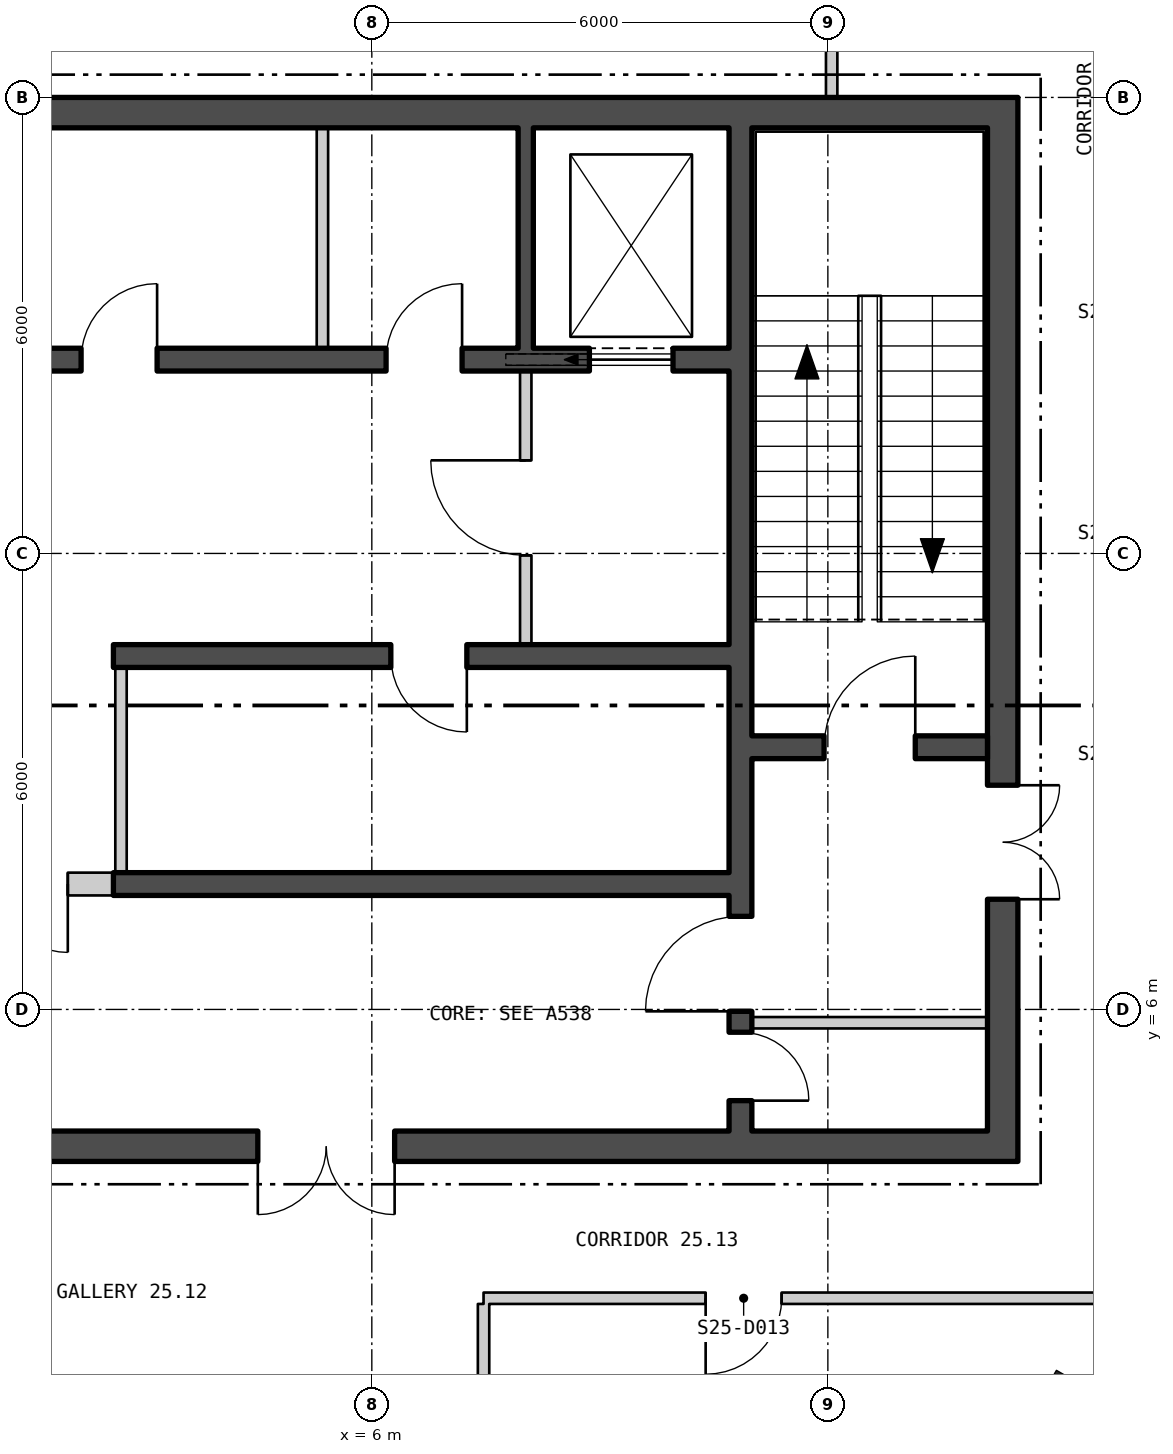
"""IFC4 building model, lengths in metres.
Left out: names, types, materials, properties, quantities, classifications, styles, units other than length and angle.
Written with IfcOpenShell. Run it as: python <this file> out.ifc"""

import sys

from ifc_helpers import new_model, si_unit, direction, frame, frame_2d, origin, origin_2d, place, context, subcontext, project, spatial, polyline, rectangle, hollow_rectangle, outline, extrude, element, fill, save


model = new_model("IFC4")
c1 = context("Model", 3, precision=1e-05, world=origin(), true_north=direction((0.0, 1.0)))
c2 = subcontext(c1, "Body", "Model", "MODEL_VIEW")
j1 = project(units=[si_unit("LENGTHUNIT", "METRE"), si_unit("PLANEANGLEUNIT", "RADIAN")], contexts=[c1])
p1 = place(None, origin())
s1 = spatial("IfcSite", under=j1, at=p1, CompositionType="ELEMENT")
p2 = place(p1, origin())
s2 = spatial("IfcBuilding", under=s1, at=p2, CompositionType="ELEMENT")
p3 = place(p2, frame((0.0, 0.0, 321.0)))
s3 = spatial("IfcBuildingStorey", under=s2, at=p3, CompositionType="ELEMENT", Elevation=321.0)
p4 = place(p3, frame((15.198, 0.882, 0.0), z_axis=(0.0, 0.0, 1.0), x_axis=(0.5, 0.866025403784, 0.0)))
e1 = element("IfcColumn", 1, at=p4, inside=s3, PredefinedType="COLUMN", context=c2, shape_type="SweptSolid", body=[
    extrude(hollow_rectangle(XDim=0.45, YDim=0.7, WallThickness=0.04, at=origin_2d()), origin(), (0.0, 0.0, 1.0), 4.2),
])
p5 = place(p3, frame((2.01, -23.11, -0.18), z_axis=(0.0, 0.0, 1.0), x_axis=(0.500000141277, 0.866025322218, 0.0)))
e2 = element("IfcWall", 2, at=p5, inside=s3, PredefinedType="SOLIDWALL", context=c2, shape_type="SweptSolid", body=[
    extrude(outline(polyline([(-0.13, -0.225), (45.86, -0.225), (45.6, 0.225), (0.13, 0.225), (-0.13, -0.225)])), origin(), (0.0, 0.0, 1.0), 3.98),
])
p6 = place(p5, frame((1.424, 0.0, 1.08)))
e3 = element("IfcOpeningElement", 3, at=p6, cuts=e2, PredefinedType="OPENING", context=c2, shape_type="SweptSolid", body=[
    extrude(rectangle(XDim=2.4, YDim=2.3, at=frame_2d((1.2, 1.15))), frame((0.0, 0.235, 0.0), z_axis=(0.0, -1.0, 0.0), x_axis=(1.0, 0.0, 0.0)), (0.0, 0.0, 1.0), 0.47),
])
p7 = place(p5, frame((5.892, 0.0, 1.08)))
e4 = element("IfcOpeningElement", 4, at=p7, cuts=e2, PredefinedType="OPENING", context=c2, shape_type="SweptSolid", body=[
    extrude(rectangle(XDim=2.4, YDim=2.3, at=frame_2d((1.2, 1.15))), frame((0.0, 0.235, 0.0), z_axis=(0.0, -1.0, 0.0), x_axis=(1.0, 0.0, 0.0)), (0.0, 0.0, 1.0), 0.47),
])
p8 = place(p5, frame((14.905, 0.0, 1.08)))
e5 = element("IfcOpeningElement", 5, at=p8, cuts=e2, PredefinedType="OPENING", context=c2, shape_type="SweptSolid", body=[
    extrude(rectangle(XDim=2.4, YDim=2.3, at=frame_2d((1.2, 1.15))), frame((0.0, 0.235, 0.0), z_axis=(0.0, -1.0, 0.0), x_axis=(1.0, 0.0, 0.0)), (0.0, 0.0, 1.0), 0.47),
])
p9 = place(p5, frame((19.412, 0.0, 1.08)))
e6 = element("IfcOpeningElement", 6, at=p9, cuts=e2, PredefinedType="OPENING", context=c2, shape_type="SweptSolid", body=[
    extrude(rectangle(XDim=2.4, YDim=2.3, at=frame_2d((1.2, 1.15))), frame((0.0, 0.235, 0.0), z_axis=(0.0, -1.0, 0.0), x_axis=(1.0, 0.0, 0.0)), (0.0, 0.0, 1.0), 0.47),
])
p10 = place(p5, frame((23.918, 0.0, 1.08)))
e7 = element("IfcOpeningElement", 7, at=p10, cuts=e2, PredefinedType="OPENING", context=c2, shape_type="SweptSolid", body=[
    extrude(rectangle(XDim=2.4, YDim=2.3, at=frame_2d((1.2, 1.15))), frame((0.0, 0.235, 0.0), z_axis=(0.0, -1.0, 0.0), x_axis=(1.0, 0.0, 0.0)), (0.0, 0.0, 1.0), 0.47),
])
p11 = place(p5, frame((28.425, 0.0, 1.08)))
e8 = element("IfcOpeningElement", 8, at=p11, cuts=e2, PredefinedType="OPENING", context=c2, shape_type="SweptSolid", body=[
    extrude(rectangle(XDim=2.4, YDim=2.3, at=frame_2d((1.2, 1.15))), frame((0.0, 0.235, 0.0), z_axis=(0.0, -1.0, 0.0), x_axis=(1.0, 0.0, 0.0)), (0.0, 0.0, 1.0), 0.47),
])
p12 = place(p5, frame((37.438, 0.0, 1.08)))
e9 = element("IfcOpeningElement", 9, at=p12, cuts=e2, PredefinedType="OPENING", context=c2, shape_type="SweptSolid", body=[
    extrude(rectangle(XDim=2.4, YDim=2.3, at=frame_2d((1.2, 1.15))), frame((0.0, 0.235, 0.0), z_axis=(0.0, -1.0, 0.0), x_axis=(1.0, 0.0, 0.0)), (0.0, 0.0, 1.0), 0.47),
])
p13 = place(p5, frame((41.907, 0.0, 1.08)))
e10 = element("IfcOpeningElement", 10, at=p13, cuts=e2, PredefinedType="OPENING", context=c2, shape_type="SweptSolid", body=[
    extrude(rectangle(XDim=2.4, YDim=2.3, at=frame_2d((1.2, 1.15))), frame((0.0, 0.235, 0.0), z_axis=(0.0, -1.0, 0.0), x_axis=(1.0, 0.0, 0.0)), (0.0, 0.0, 1.0), 0.47),
])
p14 = place(p3, frame((-14.5, 4.2, 0.0), z_axis=(0.0, 0.0, 1.0), x_axis=(1.0, 0.0, 0.0)))
e11 = element("IfcWall", 11, at=p14, inside=s3, PredefinedType="SHEAR", context=c2, shape_type="SweptSolid", body=[
    extrude(rectangle(XDim=29.0, YDim=0.4, at=frame_2d((14.5, 0.0))), origin(), (0.0, 0.0, 1.0), 4.0),
])
p15 = place(p14, frame((9.0, 0.0, 0.0)))
e12 = element("IfcOpeningElement", 12, at=p15, cuts=e11, PredefinedType="OPENING", context=c2, shape_type="SweptSolid", body=[
    extrude(rectangle(XDim=1.8, YDim=2.4, at=frame_2d((0.9, 1.2))), frame((0.0, 0.21, 0.0), z_axis=(0.0, -1.0, 0.0), x_axis=(1.0, 0.0, 0.0)), (0.0, 0.0, 1.0), 0.42),
])
p16 = place(p14, frame((19.0, 0.0, 0.0)))
e13 = element("IfcOpeningElement", 13, at=p16, cuts=e11, PredefinedType="OPENING", context=c2, shape_type="SweptSolid", body=[
    extrude(rectangle(XDim=1.8, YDim=2.4, at=frame_2d((0.9, 1.2))), frame((0.0, 0.21, 0.0), z_axis=(0.0, -1.0, 0.0), x_axis=(1.0, 0.0, 0.0)), (0.0, 0.0, 1.0), 0.42),
])
p17 = place(p3, frame((-14.5, 17.8, 0.0), z_axis=(0.0, 0.0, 1.0), x_axis=(1.0, 0.0, 0.0)))
e14 = element("IfcWall", 14, at=p17, inside=s3, PredefinedType="SHEAR", context=c2, shape_type="SweptSolid", body=[
    extrude(rectangle(XDim=29.0, YDim=0.4, at=frame_2d((14.5, 0.0))), origin(), (0.0, 0.0, 1.0), 4.0),
])
p18 = place(p3, frame((14.3, 4.4, 0.0), z_axis=(0.0, 0.0, 1.0), x_axis=(0.0, 1.0, 0.0)))
e15 = element("IfcWall", 15, at=p18, inside=s3, PredefinedType="SHEAR", context=c2, shape_type="SweptSolid", body=[
    extrude(rectangle(XDim=13.2, YDim=0.4, at=frame_2d((6.6, 0.0))), origin(), (0.0, 0.0, 1.0), 4.0),
])
p19 = place(p18, frame((3.05, 0.0, 0.0)))
e16 = element("IfcOpeningElement", 16, at=p19, cuts=e15, PredefinedType="OPENING", context=c2, shape_type="SweptSolid", body=[
    extrude(rectangle(XDim=1.5, YDim=2.1, at=frame_2d((0.75, 1.05))), frame((0.0, 0.21, 0.0), z_axis=(0.0, -1.0, 0.0), x_axis=(1.0, 0.0, 0.0)), (0.0, 0.0, 1.0), 0.42),
])
p20 = place(p3, frame((10.85, 4.4, 0.0), z_axis=(0.0, 0.0, 1.0), x_axis=(0.0, 1.0, 0.0)))
e17 = element("IfcWall", 17, at=p20, inside=s3, PredefinedType="SHEAR", context=c2, shape_type="SweptSolid", body=[
    extrude(rectangle(XDim=13.2, YDim=0.3, at=frame_2d((6.6, 0.0))), origin(), (0.0, 0.0, 1.0), 4.0),
])
p21 = place(p20, frame((1.575, 0.0, 0.0)))
e18 = element("IfcOpeningElement", 18, at=p21, cuts=e17, PredefinedType="OPENING", context=c2, shape_type="SweptSolid", body=[
    extrude(rectangle(XDim=1.25, YDim=2.1, at=frame_2d((0.625, 1.05))), frame((0.0, 0.16, 0.0), z_axis=(0.0, -1.0, 0.0), x_axis=(1.0, 0.0, 0.0)), (0.0, 0.0, 1.0), 0.32),
])
p22 = place(p20, frame((0.4, 0.0, 0.0)))
e19 = element("IfcOpeningElement", 19, at=p22, cuts=e17, PredefinedType="OPENING", context=c2, shape_type="SweptSolid", body=[
    extrude(rectangle(XDim=0.9, YDim=2.1, at=frame_2d((0.45, 1.05))), frame((0.0, 0.16, 0.0), z_axis=(0.0, -1.0, 0.0), x_axis=(1.0, 0.0, 0.0)), (0.0, 0.0, 1.0), 0.32),
])
p23 = place(p3, frame((11.0, 9.45, 0.0), z_axis=(0.0, 0.0, 1.0), x_axis=(1.0, 0.0, 0.0)))
e20 = element("IfcWall", 20, at=p23, inside=s3, PredefinedType="SHEAR", context=c2, shape_type="SweptSolid", body=[
    extrude(rectangle(XDim=3.1, YDim=0.3, at=frame_2d((1.55, 0.0))), origin(), (0.0, 0.0, 1.0), 4.0),
])
p24 = place(p23, frame((0.95, 0.0, 0.0)))
e21 = element("IfcOpeningElement", 21, at=p24, cuts=e20, PredefinedType="OPENING", context=c2, shape_type="SweptSolid", body=[
    extrude(rectangle(XDim=1.2, YDim=2.1, at=frame_2d((0.6, 1.05))), frame((0.0, 0.16, 0.0), z_axis=(0.0, -1.0, 0.0), x_axis=(1.0, 0.0, 0.0)), (0.0, 0.0, 1.0), 0.32),
])
p25 = place(p3, frame((-10.7, 14.55, 0.0), z_axis=(0.0, 0.0, 1.0), x_axis=(1.0, 0.0, 0.0)))
e22 = element("IfcWall", 22, at=p25, inside=s3, PredefinedType="SHEAR", context=c2, shape_type="SweptSolid", body=[
    extrude(rectangle(XDim=21.4, YDim=0.3, at=frame_2d((10.7, 0.0))), origin(), (0.0, 0.0, 1.0), 4.0),
])
p26 = place(p25, frame((0.738, 0.0, 0.0)))
e23 = element("IfcOpeningElement", 23, at=p26, cuts=e22, PredefinedType="OPENING", context=c2, shape_type="SweptSolid", body=[
    extrude(rectangle(XDim=1.1, YDim=2.1, at=frame_2d((0.55, 1.05))), frame((0.0, 0.16, 0.0), z_axis=(0.0, -1.0, 0.0), x_axis=(1.0, 0.0, 0.0)), (0.0, 0.0, 1.0), 0.32),
])
p27 = place(p25, frame((3.462, 0.0, 0.0)))
e24 = element("IfcOpeningElement", 24, at=p27, cuts=e22, PredefinedType="OPENING", context=c2, shape_type="SweptSolid", body=[
    extrude(rectangle(XDim=1.1, YDim=2.1, at=frame_2d((0.55, 1.05))), frame((0.0, 0.16, 0.0), z_axis=(0.0, -1.0, 0.0), x_axis=(1.0, 0.0, 0.0)), (0.0, 0.0, 1.0), 0.32),
])
p28 = place(p25, frame((6.138, 0.0, 0.0)))
e25 = element("IfcOpeningElement", 25, at=p28, cuts=e22, PredefinedType="OPENING", context=c2, shape_type="SweptSolid", body=[
    extrude(rectangle(XDim=1.1, YDim=2.1, at=frame_2d((0.55, 1.05))), frame((0.0, 0.16, 0.0), z_axis=(0.0, -1.0, 0.0), x_axis=(1.0, 0.0, 0.0)), (0.0, 0.0, 1.0), 0.32),
])
p29 = place(p25, frame((8.812, 0.0, 0.0)))
e26 = element("IfcOpeningElement", 26, at=p29, cuts=e22, PredefinedType="OPENING", context=c2, shape_type="SweptSolid", body=[
    extrude(rectangle(XDim=1.1, YDim=2.1, at=frame_2d((0.55, 1.05))), frame((0.0, 0.16, 0.0), z_axis=(0.0, -1.0, 0.0), x_axis=(1.0, 0.0, 0.0)), (0.0, 0.0, 1.0), 0.32),
])
p30 = place(p25, frame((19.562, 0.0, 0.0)))
e27 = element("IfcOpeningElement", 27, at=p30, cuts=e22, PredefinedType="OPENING", context=c2, shape_type="SweptSolid", body=[
    extrude(rectangle(XDim=1.1, YDim=2.1, at=frame_2d((0.55, 1.05))), frame((0.0, 0.16, 0.0), z_axis=(0.0, -1.0, 0.0), x_axis=(1.0, 0.0, 0.0)), (0.0, 0.0, 1.0), 0.32),
])
p31 = place(p25, frame((12.875, 0.0, 0.0)))
e28 = element("IfcOpeningElement", 28, at=p31, cuts=e22, PredefinedType="OPENING", context=c2, shape_type="SweptSolid", body=[
    extrude(rectangle(XDim=1.0, YDim=2.1, at=frame_2d((0.5, 1.05))), frame((0.0, 0.16, 0.0), z_axis=(0.0, -1.0, 0.0), x_axis=(1.0, 0.0, 0.0)), (0.0, 0.0, 1.0), 0.32),
])
p32 = place(p25, frame((16.887, 0.0, 0.0)))
e29 = element("IfcOpeningElement", 29, at=p32, cuts=e22, PredefinedType="OPENING", context=c2, shape_type="SweptSolid", body=[
    extrude(rectangle(XDim=1.0, YDim=2.1, at=frame_2d((0.5, 1.05))), frame((0.0, 0.16, 0.0), z_axis=(0.0, -1.0, 0.0), x_axis=(1.0, 0.0, 0.0)), (0.0, 0.0, 1.0), 0.32),
])
p33 = place(p3, frame((2.6, 10.65, 0.0), z_axis=(0.0, 0.0, 1.0), x_axis=(1.0, 0.0, 0.0)))
e30 = element("IfcWall", 30, at=p33, inside=s3, PredefinedType="SHEAR", context=c2, shape_type="SweptSolid", body=[
    extrude(rectangle(XDim=8.1, YDim=0.3, at=frame_2d((4.05, 0.0))), origin(), (0.0, 0.0, 1.0), 4.0),
])
p34 = place(p33, frame((3.65, 0.0, 0.0)))
e31 = element("IfcOpeningElement", 31, at=p34, cuts=e30, PredefinedType="OPENING", context=c2, shape_type="SweptSolid", body=[
    extrude(rectangle(XDim=1.0, YDim=2.1, at=frame_2d((0.5, 1.05))), frame((0.0, 0.16, 0.0), z_axis=(0.0, -1.0, 0.0), x_axis=(1.0, 0.0, 0.0)), (0.0, 0.0, 1.0), 0.32),
])
p35 = place(p3, frame((2.6, 7.65, 0.0), z_axis=(0.0, 0.0, 1.0), x_axis=(1.0, 0.0, 0.0)))
e32 = element("IfcWall", 32, at=p35, inside=s3, PredefinedType="SHEAR", context=c2, shape_type="SweptSolid", body=[
    extrude(rectangle(XDim=8.1, YDim=0.3, at=frame_2d((4.05, 0.0))), origin(), (0.0, 0.0, 1.0), 4.0),
])
p36 = place(p3, frame((5.35, 14.7, 0.0), z_axis=(0.0, 0.0, 1.0), x_axis=(0.0, 1.0, 0.0)))
e33 = element("IfcWall", 33, at=p36, inside=s3, PredefinedType="PARTITIONING", context=c2, shape_type="SweptSolid", body=[
    extrude(rectangle(XDim=2.9, YDim=0.15, at=frame_2d((1.45, 0.0))), origin(), (0.0, 0.0, 1.0), 4.0),
])
p37 = place(p3, frame((8.025, 14.7, 0.0), z_axis=(0.0, 0.0, 1.0), x_axis=(0.0, 1.0, 0.0)))
e34 = element("IfcWall", 34, at=p37, inside=s3, PredefinedType="SHEAR", context=c2, shape_type="SweptSolid", body=[
    extrude(rectangle(XDim=2.9, YDim=0.2, at=frame_2d((1.45, 0.0))), origin(), (0.0, 0.0, 1.0), 4.0),
])
p38 = place(p3, frame((2.7, 7.8, 0.0), z_axis=(0.0, 0.0, 1.0), x_axis=(0.0, 1.0, 0.0)))
e35 = element("IfcWall", 35, at=p38, inside=s3, PredefinedType="PARTITIONING", context=c2, shape_type="SweptSolid", body=[
    extrude(rectangle(XDim=2.7, YDim=0.15, at=frame_2d((1.35, 0.0))), origin(), (0.0, 0.0, 1.0), 4.0),
])
p39 = place(p3, frame((8.025, 10.8, 0.0), z_axis=(0.0, 0.0, 1.0), x_axis=(0.0, 1.0, 0.0)))
e36 = element("IfcWall", 36, at=p39, inside=s3, PredefinedType="PARTITIONING", context=c2, shape_type="SweptSolid", body=[
    extrude(rectangle(XDim=3.6, YDim=0.15, at=frame_2d((1.8, 0.0))), origin(), (0.0, 0.0, 1.0), 4.0),
])
p40 = place(p39, frame((1.175, 0.0, 0.0)))
e37 = element("IfcOpeningElement", 37, at=p40, cuts=e36, PredefinedType="OPENING", context=c2, shape_type="SweptSolid", body=[
    extrude(rectangle(XDim=1.25, YDim=2.1, at=frame_2d((0.625, 1.05))), frame((0.0, 0.085, 0.0), z_axis=(0.0, -1.0, 0.0), x_axis=(1.0, 0.0, 0.0)), (0.0, 0.0, 1.0), 0.17),
])
p41 = place(p3, frame((11.0, 5.825, 0.0), z_axis=(0.0, 0.0, 1.0), x_axis=(1.0, 0.0, 0.0)))
e38 = element("IfcWall", 38, at=p41, inside=s3, PredefinedType="PARTITIONING", context=c2, shape_type="SweptSolid", body=[
    extrude(rectangle(XDim=3.1, YDim=0.15, at=frame_2d((1.55, 0.0))), origin(), (0.0, 0.0, 1.0), 4.0),
])
p42 = place(p3, frame((-0.4, 7.65, 0.0), z_axis=(0.0, 0.0, 1.0), x_axis=(1.0, 0.0, 0.0)))
e39 = element("IfcWall", 39, at=p42, inside=s3, PredefinedType="PARTITIONING", context=c2, shape_type="SweptSolid", body=[
    extrude(rectangle(XDim=3.0, YDim=0.3, at=frame_2d((1.5, 0.0))), origin(), (0.0, 0.0, 1.0), 4.0),
])
p43 = place(p42, frame((0.6, 0.0, 0.0)))
e40 = element("IfcOpeningElement", 40, at=p43, cuts=e39, PredefinedType="OPENING", context=c2, shape_type="SweptSolid", body=[
    extrude(rectangle(XDim=1.8, YDim=2.4, at=frame_2d((0.9, 1.2))), frame((0.0, 0.16, 0.0), z_axis=(0.0, -1.0, 0.0), x_axis=(1.0, 0.0, 0.0)), (0.0, 0.0, 1.0), 0.32),
])
p44 = place(p3, frame((7.47, 0.812, 0.0), z_axis=(0.0, 0.0, 1.0), x_axis=(0.0, 1.0, 0.0)))
e41 = element("IfcWall", 41, at=p44, inside=s3, PredefinedType="PARTITIONING", context=c2, shape_type="SweptSolid", body=[
    extrude(rectangle(XDim=1.313, YDim=0.15, at=frame_2d((0.656, 0.0))), origin(), (0.0, 0.0, 1.0), 4.0),
])
p45 = place(p3, frame((7.47, 2.2, 0.0), z_axis=(0.0, 0.0, 1.0), x_axis=(1.0, 0.0, 0.0)))
e42 = element("IfcWall", 42, at=p45, inside=s3, PredefinedType="PARTITIONING", context=c2, shape_type="SweptSolid", body=[
    extrude(rectangle(XDim=8.755, YDim=0.15, at=frame_2d((4.378, 0.0))), origin(), (0.0, 0.0, 1.0), 4.0),
])
p46 = place(p45, frame((2.922, 0.0, 0.0)))
e43 = element("IfcOpeningElement", 43, at=p46, cuts=e42, PredefinedType="OPENING", context=c2, shape_type="SweptSolid", body=[
    extrude(rectangle(XDim=1.0, YDim=2.1, at=frame_2d((0.5, 1.05))), frame((0.0, 0.085, 0.0), z_axis=(0.0, -1.0, 0.0), x_axis=(1.0, 0.0, 0.0)), (0.0, 0.0, 1.0), 0.17),
])
p47 = place(p3, frame((12.05, 18.0, 0.0), z_axis=(0.0, 0.0, 1.0), x_axis=(0.0, 1.0, 0.0)))
e44 = element("IfcWall", 44, at=p47, inside=s3, PredefinedType="PARTITIONING", context=c2, shape_type="SweptSolid", body=[
    extrude(rectangle(XDim=1.75, YDim=0.15, at=frame_2d((0.875, 0.0))), origin(), (0.0, 0.0, 1.0), 4.0),
])
p48 = place(p30, origin())
e45 = element("IfcDoor", 45, at=p48, inside=s3, OperationType="SLIDING_TO_LEFT", PredefinedType="DOOR", context=c2, shape_type="SweptSolid", body=[
    extrude(rectangle(XDim=1.1, YDim=2.1, at=frame_2d((0.55, 1.05))), frame((0.0, 0.025, 0.0), z_axis=(0.0, -1.0, 0.0), x_axis=(1.0, 0.0, 0.0)), (0.0, 0.0, 1.0), 0.05),
])
fill(e27, e45)
p49 = place(p31, origin())
e46 = element("IfcDoor", 46, at=p49, inside=s3, OperationType="SINGLE_SWING_LEFT", PredefinedType="DOOR", context=c2, shape_type="SweptSolid", body=[
    extrude(rectangle(XDim=1.0, YDim=2.1, at=frame_2d((0.5, 1.05))), frame((0.0, 0.025, 0.0), z_axis=(0.0, -1.0, 0.0), x_axis=(1.0, 0.0, 0.0)), (0.0, 0.0, 1.0), 0.05),
])
fill(e28, e46)
p50 = place(p32, origin())
e47 = element("IfcDoor", 47, at=p50, inside=s3, OperationType="SINGLE_SWING_LEFT", PredefinedType="DOOR", context=c2, shape_type="SweptSolid", body=[
    extrude(rectangle(XDim=1.0, YDim=2.1, at=frame_2d((0.5, 1.05))), frame((0.0, 0.025, 0.0), z_axis=(0.0, -1.0, 0.0), x_axis=(1.0, 0.0, 0.0)), (0.0, 0.0, 1.0), 0.05),
])
fill(e29, e47)
p51 = place(p34, origin())
e48 = element("IfcDoor", 48, at=p51, inside=s3, OperationType="SINGLE_SWING_RIGHT", PredefinedType="DOOR", context=c2, shape_type="SweptSolid", body=[
    extrude(rectangle(XDim=1.0, YDim=2.1, at=frame_2d((0.5, 1.05))), frame((0.0, 0.025, 0.0), z_axis=(0.0, -1.0, 0.0), x_axis=(1.0, 0.0, 0.0)), (0.0, 0.0, 1.0), 0.05),
])
fill(e31, e48)
p52 = place(p40, origin())
e49 = element("IfcDoor", 49, at=p52, inside=s3, OperationType="SINGLE_SWING_LEFT", PredefinedType="DOOR", context=c2, shape_type="SweptSolid", body=[
    extrude(rectangle(XDim=1.25, YDim=2.1, at=frame_2d((0.625, 1.05))), frame((0.0, 0.025, 0.0), z_axis=(0.0, -1.0, 0.0), x_axis=(1.0, 0.0, 0.0)), (0.0, 0.0, 1.0), 0.05),
])
fill(e37, e49)
p53 = place(p24, origin())
e50 = element("IfcDoor", 50, at=p53, inside=s3, OperationType="SINGLE_SWING_LEFT", PredefinedType="DOOR", context=c2, shape_type="SweptSolid", body=[
    extrude(rectangle(XDim=1.2, YDim=2.1, at=frame_2d((0.6, 1.05))), frame((0.0, 0.025, 0.0), z_axis=(0.0, -1.0, 0.0), x_axis=(1.0, 0.0, 0.0)), (0.0, 0.0, 1.0), 0.05),
])
fill(e21, e50)
p54 = place(p21, origin())
e51 = element("IfcDoor", 51, at=p54, inside=s3, OperationType="SINGLE_SWING_RIGHT", PredefinedType="DOOR", context=c2, shape_type="SweptSolid", body=[
    extrude(rectangle(XDim=1.25, YDim=2.1, at=frame_2d((0.625, 1.05))), frame((0.0, 0.025, 0.0), z_axis=(0.0, -1.0, 0.0), x_axis=(1.0, 0.0, 0.0)), (0.0, 0.0, 1.0), 0.05),
])
fill(e18, e51)
p55 = place(p19, origin())
e52 = element("IfcDoor", 52, at=p55, inside=s3, OperationType="DOUBLE_DOOR_SINGLE_SWING", PredefinedType="DOOR", context=c2, shape_type="SweptSolid", body=[
    extrude(rectangle(XDim=1.5, YDim=2.1, at=frame_2d((0.75, 1.05))), frame((0.0, 0.025, 0.0), z_axis=(0.0, -1.0, 0.0), x_axis=(1.0, 0.0, 0.0)), (0.0, 0.0, 1.0), 0.05),
])
fill(e16, e52)
p56 = place(p22, origin())
e53 = element("IfcDoor", 53, at=p56, inside=s3, OperationType="SINGLE_SWING_LEFT", PredefinedType="DOOR", context=c2, shape_type="SweptSolid", body=[
    extrude(rectangle(XDim=0.9, YDim=2.1, at=frame_2d((0.45, 1.05))), frame((0.0, 0.025, 0.0), z_axis=(0.0, -1.0, 0.0), x_axis=(1.0, 0.0, 0.0)), (0.0, 0.0, 1.0), 0.05),
])
fill(e19, e53)
p57 = place(p43, origin())
e54 = element("IfcDoor", 54, at=p57, inside=s3, OperationType="DOUBLE_DOOR_SINGLE_SWING", PredefinedType="DOOR", context=c2, shape_type="SweptSolid", body=[
    extrude(rectangle(XDim=1.8, YDim=2.4, at=frame_2d((0.9, 1.2))), frame((0.0, 0.025, 0.0), z_axis=(0.0, -1.0, 0.0), x_axis=(1.0, 0.0, 0.0)), (0.0, 0.0, 1.0), 0.05),
])
fill(e40, e54)
p58 = place(p16, origin())
e55 = element("IfcDoor", 55, at=p58, inside=s3, OperationType="DOUBLE_DOOR_SINGLE_SWING", PredefinedType="DOOR", context=c2, shape_type="SweptSolid", body=[
    extrude(rectangle(XDim=1.8, YDim=2.4, at=frame_2d((0.9, 1.2))), frame((0.0, 0.025, 0.0), z_axis=(0.0, -1.0, 0.0), x_axis=(1.0, 0.0, 0.0)), (0.0, 0.0, 1.0), 0.05),
])
fill(e13, e55)
p59 = place(p46, origin())
e56 = element("IfcDoor", 56, at=p59, inside=s3, OperationType="SINGLE_SWING_LEFT", PredefinedType="DOOR", context=c2, shape_type="SweptSolid", body=[
    extrude(rectangle(XDim=1.0, YDim=2.1, at=frame_2d((0.5, 1.05))), frame((0.0, 0.025, 0.0), z_axis=(0.0, -1.0, 0.0), x_axis=(1.0, 0.0, 0.0)), (0.0, 0.0, 1.0), 0.05),
])
fill(e43, e56)
save(model, sys.argv[1])
